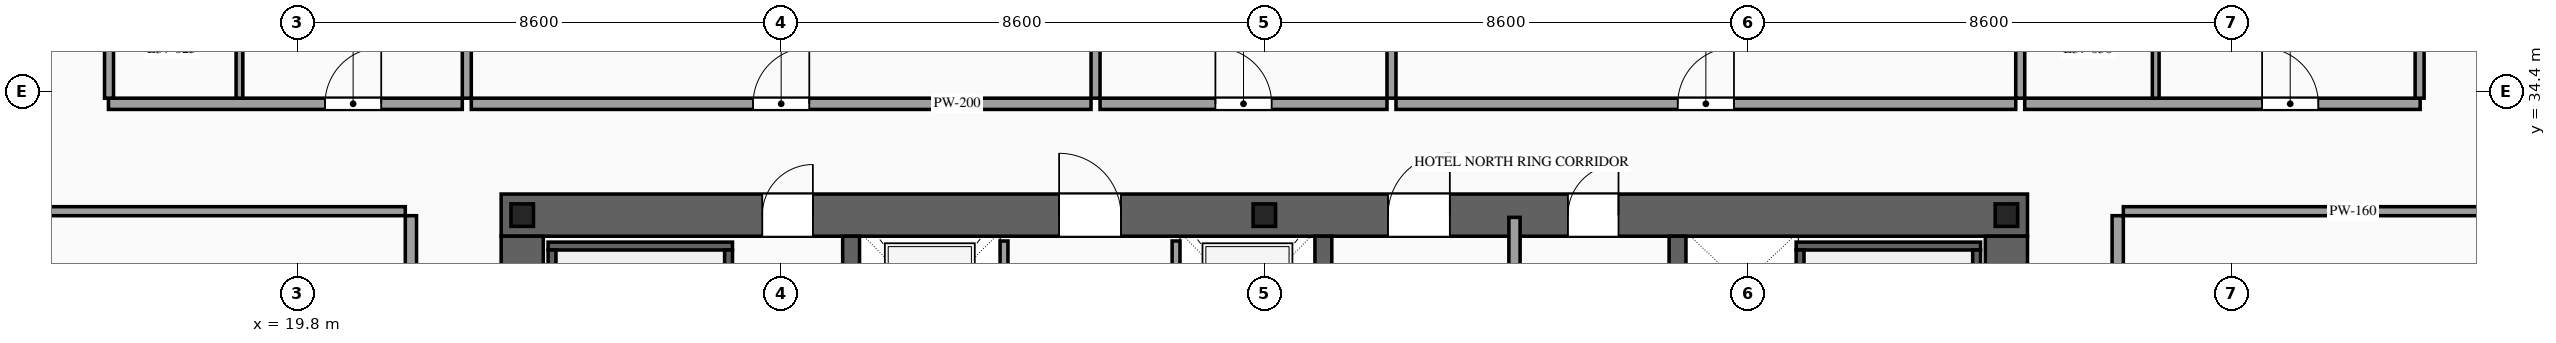
"""IFC4 building model, lengths in metres.
Left out: names, types, materials, properties, quantities, classifications, styles, units other than length and angle.
Written with IfcOpenShell. Run it as: python <this file> out.ifc"""

import sys

from ifc_helpers import new_model, si_unit, direction, frame, frame_2d, origin, origin_2d, place, context, subcontext, project, spatial, rectangle, i_section, extrude, source, transform, mapped, element, fill, save


model = new_model("IFC4")
c1 = context("Model", 3, precision=1e-05, world=origin(), true_north=direction((0.0, 1.0)))
c2 = subcontext(c1, "Body", "Model", "MODEL_VIEW")
j1 = project(units=[si_unit("LENGTHUNIT", "METRE"), si_unit("PLANEANGLEUNIT", "RADIAN")], contexts=[c1])
p1 = place(None, origin())
s1 = spatial("IfcSite", under=j1, at=p1, CompositionType="ELEMENT")
p2 = place(p1, origin())
s2 = spatial("IfcBuilding", under=s1, at=p2, CompositionType="ELEMENT")
p3 = place(p2, frame((0.0, 0.0, 141.6)))
s3 = spatial("IfcBuildingStorey", under=s2, at=p3, CompositionType="ELEMENT", Elevation=141.6)
p4 = place(p3, frame((23.425, 32.2, 0.0), z_axis=(0.0, 0.0, 1.0), x_axis=(1.0, 0.0, 0.0)))
e1 = element("IfcWall", 1, at=p4, inside=s3, PredefinedType="SHEAR", context=c2, shape_type="SweptSolid", body=[
    extrude(rectangle(XDim=27.15, YDim=0.75, at=frame_2d((13.575, 0.0))), origin(), (0.0, 0.0, 1.0), 3.6),
])
p5 = place(p4, frame((4.645, 0.0, 0.0)))
e2 = element("IfcOpeningElement", 2, at=p5, cuts=e1, PredefinedType="OPENING", context=c2, shape_type="SweptSolid", body=[
    extrude(rectangle(XDim=0.9, YDim=2.15, at=frame_2d((0.45, 1.075))), frame((0.0, 0.39, 0.0), z_axis=(0.0, -1.0, 0.0), x_axis=(1.0, 0.0, 0.0)), (0.0, 0.0, 1.0), 0.78),
])
p6 = place(p4, frame((9.925, 0.0, 0.0)))
e3 = element("IfcOpeningElement", 3, at=p6, cuts=e1, PredefinedType="OPENING", context=c2, shape_type="SweptSolid", body=[
    extrude(rectangle(XDim=1.1, YDim=2.2, at=frame_2d((0.55, 1.1))), frame((0.0, 0.39, 0.0), z_axis=(0.0, -1.0, 0.0), x_axis=(1.0, 0.0, 0.0)), (0.0, 0.0, 1.0), 0.78),
])
p7 = place(p4, frame((15.775, 0.0, 0.0)))
e4 = element("IfcOpeningElement", 4, at=p7, cuts=e1, PredefinedType="OPENING", context=c2, shape_type="SweptSolid", body=[
    extrude(rectangle(XDim=1.1, YDim=2.2, at=frame_2d((0.55, 1.1))), frame((0.0, 0.39, 0.0), z_axis=(0.0, -1.0, 0.0), x_axis=(1.0, 0.0, 0.0)), (0.0, 0.0, 1.0), 0.78),
])
p8 = place(p4, frame((18.975, 0.0, 0.0)))
e5 = element("IfcOpeningElement", 5, at=p8, cuts=e1, PredefinedType="OPENING", context=c2, shape_type="SweptSolid", body=[
    extrude(rectangle(XDim=0.9, YDim=2.15, at=frame_2d((0.45, 1.075))), frame((0.0, 0.39, 0.0), z_axis=(0.0, -1.0, 0.0), x_axis=(1.0, 0.0, 0.0)), (0.0, 0.0, 1.0), 0.78),
])
m1 = source(origin(), c2, "Body", "SweptSolid", [
    extrude(rectangle(XDim=12.05, YDim=0.75, at=frame_2d((6.025, 0.0))), origin(), (0.0, 0.0, 1.0), 3.6),
])
for number, where, z_axis, x_axis in (
    (6, (23.8, 19.775, 0.0), (0.0, 0.0, 1.0), (0.0, 1.0, 0.0)),
    (7, (50.2, 19.775, 0.0), (0.0, 0.0, 1.0), (0.0, 1.0, 0.0)),
):
    element("IfcWall", number, at=place(p3, frame(where, z_axis=z_axis, x_axis=x_axis)), inside=s3, PredefinedType="SHEAR", context=c2, shape_type="MappedRepresentation", body=[
        mapped(m1, transform((0.0, 0.0, 0.0), scale=1.0)),
    ])
m2 = source(origin(), c2, "Body", "SweptSolid", [
    extrude(rectangle(XDim=12.05, YDim=0.3, at=frame_2d((6.025, 0.0))), origin(), (0.0, 0.0, 1.0), 3.6),
])
for number, where, z_axis, x_axis in (
    (8, (29.65, 19.775, 0.0), (0.0, 0.0, 1.0), (0.0, 1.0, 0.0)),
    (9, (38.05, 19.775, 0.0), (0.0, 0.0, 1.0), (0.0, 1.0, 0.0)),
    (10, (44.35, 19.775, 0.0), (0.0, 0.0, 1.0), (0.0, 1.0, 0.0)),
):
    element("IfcWall", number, at=place(p3, frame(where, z_axis=z_axis, x_axis=x_axis)), inside=s3, PredefinedType="SOLIDWALL", context=c2, shape_type="MappedRepresentation", body=[
        mapped(m2, transform((0.0, 0.0, 0.0), scale=1.0)),
    ])
m3 = source(origin(), c2, "Body", "SweptSolid", [
    extrude(i_section(OverallWidth=0.4, OverallDepth=0.4, WebThickness=0.013, FlangeThickness=0.021, at=origin_2d()), origin(), (0.0, 0.0, 1.0), 3.6),
])
for number, where, z_axis, x_axis in (
    (11, (23.8, 32.2, 0.0), (0.0, 0.0, 1.0), (1.0, 0.0, 0.0)),
    (12, (37.0, 32.2, 0.0), (0.0, 0.0, 1.0), (1.0, 0.0, 0.0)),
    (13, (50.2, 32.2, 0.0), (0.0, 0.0, 1.0), (1.0, 0.0, 0.0)),
):
    element("IfcColumn", number, at=place(p3, frame(where, z_axis=z_axis, x_axis=x_axis)), inside=s3, PredefinedType="COLUMN", context=c2, shape_type="MappedRepresentation", body=[
        mapped(m3, transform((0.0, 0.0, 0.0), scale=1.0)),
    ])
p9 = place(p3, frame((32.37, 29.4, 0.0), z_axis=(0.0, 0.0, 1.0), x_axis=(0.0, 1.0, 0.0)))
e14 = element("IfcWall", 14, at=p9, inside=s3, PredefinedType="SOLIDWALL", context=c2, shape_type="SweptSolid", body=[
    extrude(rectangle(XDim=2.34, YDim=0.14, at=frame_2d((1.17, 0.0))), origin(), (0.0, 0.0, 1.0), 3.38),
])
p10 = place(p9, frame((0.62, 0.0, 0.0)))
e15 = element("IfcOpeningElement", 15, at=p10, cuts=e14, PredefinedType="OPENING", context=c2, shape_type="SweptSolid", body=[
    extrude(rectangle(XDim=1.1, YDim=2.2, at=frame_2d((0.55, 1.1))), frame((0.0, 0.085, 0.0), z_axis=(0.0, -1.0, 0.0), x_axis=(1.0, 0.0, 0.0)), (0.0, 0.0, 1.0), 0.17),
])
p11 = place(p3, frame((35.43, 29.4, 0.0), z_axis=(0.0, 0.0, 1.0), x_axis=(0.0, 1.0, 0.0)))
e16 = element("IfcWall", 16, at=p11, inside=s3, PredefinedType="SOLIDWALL", context=c2, shape_type="SweptSolid", body=[
    extrude(rectangle(XDim=2.34, YDim=0.14, at=frame_2d((1.17, 0.0))), origin(), (0.0, 0.0, 1.0), 3.38),
])
p12 = place(p11, frame((0.62, 0.0, 0.0)))
e17 = element("IfcOpeningElement", 17, at=p12, cuts=e16, PredefinedType="OPENING", context=c2, shape_type="SweptSolid", body=[
    extrude(rectangle(XDim=1.1, YDim=2.2, at=frame_2d((0.55, 1.1))), frame((0.0, 0.085, 0.0), z_axis=(0.0, -1.0, 0.0), x_axis=(1.0, 0.0, 0.0)), (0.0, 0.0, 1.0), 0.17),
])
m4 = source(origin(), c2, "Body", "SweptSolid", [
    extrude(rectangle(XDim=3.28, YDim=0.14, at=frame_2d((1.64, 0.0))), origin(), (0.0, 0.0, 1.0), 3.38),
])
p13 = place(p3, frame((24.26, 31.65, 0.0), z_axis=(0.0, 0.0, 1.0), x_axis=(1.0, 0.0, 0.0)))
e18 = element("IfcWall", 18, at=p13, inside=s3, PredefinedType="SOLIDWALL", context=c2, shape_type="MappedRepresentation", body=[
    mapped(m4, transform((0.0, 0.0, 0.0), scale=1.0)),
])
m5 = source(origin(), c2, "Body", "SweptSolid", [
    extrude(rectangle(XDim=8.94, YDim=0.14, at=frame_2d((4.47, 0.0))), origin(), (0.0, 0.0, 1.0), 3.38),
])
for number, where, z_axis, x_axis in (
    (19, (24.33, 22.64, 0.0), (0.0, 0.0, 1.0), (0.0, 1.0, 0.0)),
    (20, (27.47, 22.64, 0.0), (0.0, 0.0, 1.0), (0.0, 1.0, 0.0)),
):
    element("IfcWall", number, at=place(p3, frame(where, z_axis=z_axis, x_axis=x_axis)), inside=s3, PredefinedType="SOLIDWALL", context=c2, shape_type="MappedRepresentation", body=[
        mapped(m5, transform((0.0, 0.0, 0.0), scale=1.0)),
    ])
p14 = place(p3, frame((46.46, 31.65, 0.0), z_axis=(0.0, 0.0, 1.0), x_axis=(1.0, 0.0, 0.0)))
e21 = element("IfcWall", 21, at=p14, inside=s3, PredefinedType="SOLIDWALL", context=c2, shape_type="MappedRepresentation", body=[
    mapped(m4, transform((0.0, 0.0, 0.0), scale=1.0)),
])
for number, where, z_axis, x_axis in (
    (22, (46.53, 22.64, 0.0), (0.0, 0.0, 1.0), (0.0, 1.0, 0.0)),
    (23, (49.67, 22.64, 0.0), (0.0, 0.0, 1.0), (0.0, 1.0, 0.0)),
):
    element("IfcWall", number, at=place(p3, frame(where, z_axis=z_axis, x_axis=x_axis)), inside=s3, PredefinedType="SOLIDWALL", context=c2, shape_type="MappedRepresentation", body=[
        mapped(m5, transform((0.0, 0.0, 0.0), scale=1.0)),
    ])
m6 = source(origin(), c2, "Body", "SweptSolid", [
    extrude(rectangle(XDim=5.96, YDim=0.2, at=frame_2d((2.98, 0.0))), origin(), (0.0, 0.0, 1.0), 3.38),
])
p15 = place(p3, frame((41.45, 26.2, 0.0), z_axis=(0.0, 0.0, 1.0), x_axis=(0.0, 1.0, 0.0)))
e24 = element("IfcWall", 24, at=p15, inside=s3, PredefinedType="PARTITIONING", context=c2, shape_type="MappedRepresentation", body=[
    mapped(m6, transform((0.0, 0.0, 0.0), scale=1.0)),
])
p16 = place(p3, frame((16.44, 34.18, 0.0), z_axis=(0.0, 0.0, 1.0), x_axis=(1.0, 0.0, 0.0)))
e25 = element("IfcWall", 25, at=p16, inside=s3, PredefinedType="PARTITIONING", context=c2, shape_type="SweptSolid", body=[
    extrude(rectangle(XDim=6.294, YDim=0.2, at=frame_2d((3.147, 0.0))), origin(), (0.0, 0.0, 1.0), 3.38),
])
p17 = place(p16, frame((3.852, 0.0, 0.0)))
e26 = element("IfcOpeningElement", 26, at=p17, cuts=e25, PredefinedType="OPENING", context=c2, shape_type="SweptSolid", body=[
    extrude(rectangle(XDim=1.0, YDim=2.2, at=frame_2d((0.5, 1.1))), frame((0.0, 0.115, 0.0), z_axis=(0.0, -1.0, 0.0), x_axis=(1.0, 0.0, 0.0)), (0.0, 0.0, 1.0), 0.23),
])
m7 = source(origin(), c2, "Body", "SweptSolid", [
    extrude(rectangle(XDim=14.97, YDim=0.16, at=frame_2d((7.485, 0.0))), origin(), (0.0, 0.0, 1.0), 3.38),
])
p18 = place(p3, frame((22.814, 34.28, 0.0), z_axis=(0.0, 0.0, 1.0), x_axis=(0.0, 1.0, 0.0)))
e27 = element("IfcWall", 27, at=p18, inside=s3, PredefinedType="PARTITIONING", context=c2, shape_type="MappedRepresentation", body=[
    mapped(m7, transform((0.0, 0.0, 0.0), scale=1.0)),
])
m8 = source(origin(), c2, "Body", "SweptSolid", [
    extrude(rectangle(XDim=2.42, YDim=0.12, at=frame_2d((1.21, 0.0))), origin(), (0.0, 0.0, 1.0), 3.38),
])
p19 = place(p3, frame((18.77, 34.28, 0.0), z_axis=(0.0, 0.0, 1.0), x_axis=(0.0, 1.0, 0.0)))
e28 = element("IfcWall", 28, at=p19, inside=s3, PredefinedType="PARTITIONING", context=c2, shape_type="MappedRepresentation", body=[
    mapped(m8, transform((0.0, 0.0, 0.0), scale=1.0)),
])
p20 = place(p3, frame((22.894, 34.18, 0.0), z_axis=(0.0, 0.0, 1.0), x_axis=(1.0, 0.0, 0.0)))
e29 = element("IfcWall", 29, at=p20, inside=s3, PredefinedType="PARTITIONING", context=c2, shape_type="SweptSolid", body=[
    extrude(rectangle(XDim=11.024, YDim=0.2, at=frame_2d((5.512, 0.0))), origin(), (0.0, 0.0, 1.0), 3.38),
])
p21 = place(p20, frame((5.012, 0.0, 0.0)))
e30 = element("IfcOpeningElement", 30, at=p21, cuts=e29, PredefinedType="OPENING", context=c2, shape_type="SweptSolid", body=[
    extrude(rectangle(XDim=1.0, YDim=2.2, at=frame_2d((0.5, 1.1))), frame((0.0, 0.115, 0.0), z_axis=(0.0, -1.0, 0.0), x_axis=(1.0, 0.0, 0.0)), (0.0, 0.0, 1.0), 0.23),
])
p22 = place(p3, frame((33.998, 34.28, 0.0), z_axis=(0.0, 0.0, 1.0), x_axis=(0.0, 1.0, 0.0)))
e31 = element("IfcWall", 31, at=p22, inside=s3, PredefinedType="PARTITIONING", context=c2, shape_type="MappedRepresentation", body=[
    mapped(m7, transform((0.0, 0.0, 0.0), scale=1.0)),
])
p23 = place(p3, frame((34.078, 34.18, 0.0), z_axis=(0.0, 0.0, 1.0), x_axis=(1.0, 0.0, 0.0)))
e32 = element("IfcWall", 32, at=p23, inside=s3, PredefinedType="PARTITIONING", context=c2, shape_type="SweptSolid", body=[
    extrude(rectangle(XDim=5.104, YDim=0.2, at=frame_2d((2.552, 0.0))), origin(), (0.0, 0.0, 1.0), 3.38),
])
p24 = place(p23, frame((2.052, 0.0, 0.0)))
e33 = element("IfcOpeningElement", 33, at=p24, cuts=e32, PredefinedType="OPENING", context=c2, shape_type="SweptSolid", body=[
    extrude(rectangle(XDim=1.0, YDim=2.2, at=frame_2d((0.5, 1.1))), frame((0.0, 0.115, 0.0), z_axis=(0.0, -1.0, 0.0), x_axis=(1.0, 0.0, 0.0)), (0.0, 0.0, 1.0), 0.23),
])
p25 = place(p3, frame((39.262, 34.28, 0.0), z_axis=(0.0, 0.0, 1.0), x_axis=(0.0, 1.0, 0.0)))
e34 = element("IfcWall", 34, at=p25, inside=s3, PredefinedType="PARTITIONING", context=c2, shape_type="MappedRepresentation", body=[
    mapped(m7, transform((0.0, 0.0, 0.0), scale=1.0)),
])
p26 = place(p3, frame((39.342, 34.18, 0.0), z_axis=(0.0, 0.0, 1.0), x_axis=(1.0, 0.0, 0.0)))
e35 = element("IfcWall", 35, at=p26, inside=s3, PredefinedType="PARTITIONING", context=c2, shape_type="SweptSolid", body=[
    extrude(rectangle(XDim=11.024, YDim=0.2, at=frame_2d((5.512, 0.0))), origin(), (0.0, 0.0, 1.0), 3.38),
])
p27 = place(p26, frame((5.012, 0.0, 0.0)))
e36 = element("IfcOpeningElement", 36, at=p27, cuts=e35, PredefinedType="OPENING", context=c2, shape_type="SweptSolid", body=[
    extrude(rectangle(XDim=1.0, YDim=2.2, at=frame_2d((0.5, 1.1))), frame((0.0, 0.115, 0.0), z_axis=(0.0, -1.0, 0.0), x_axis=(1.0, 0.0, 0.0)), (0.0, 0.0, 1.0), 0.23),
])
p28 = place(p3, frame((50.446, 34.28, 0.0), z_axis=(0.0, 0.0, 1.0), x_axis=(0.0, 1.0, 0.0)))
e37 = element("IfcWall", 37, at=p28, inside=s3, PredefinedType="PARTITIONING", context=c2, shape_type="MappedRepresentation", body=[
    mapped(m7, transform((0.0, 0.0, 0.0), scale=1.0)),
])
p29 = place(p3, frame((50.526, 34.18, 0.0), z_axis=(0.0, 0.0, 1.0), x_axis=(1.0, 0.0, 0.0)))
e38 = element("IfcWall", 38, at=p29, inside=s3, PredefinedType="PARTITIONING", context=c2, shape_type="SweptSolid", body=[
    extrude(rectangle(XDim=7.034, YDim=0.2, at=frame_2d((3.517, 0.0))), origin(), (0.0, 0.0, 1.0), 3.38),
])
p30 = place(p29, frame((4.222, 0.0, 0.0)))
e39 = element("IfcOpeningElement", 39, at=p30, cuts=e38, PredefinedType="OPENING", context=c2, shape_type="SweptSolid", body=[
    extrude(rectangle(XDim=1.0, YDim=2.2, at=frame_2d((0.5, 1.1))), frame((0.0, 0.115, 0.0), z_axis=(0.0, -1.0, 0.0), x_axis=(1.0, 0.0, 0.0)), (0.0, 0.0, 1.0), 0.23),
])
m9 = source(origin(), c2, "Body", "SweptSolid", [
    extrude(rectangle(XDim=14.82, YDim=0.16, at=frame_2d((7.41, 0.0))), origin(), (0.0, 0.0, 1.0), 3.38),
])
for number, where, z_axis, x_axis in (
    (40, (16.45, 34.28, 0.0), (0.0, 0.0, 1.0), (0.0, 1.0, 0.0)),
    (41, (57.55, 34.28, 0.0), (0.0, 0.0, 1.0), (0.0, 1.0, 0.0)),
):
    element("IfcWall", number, at=place(p3, frame(where, z_axis=z_axis, x_axis=x_axis)), inside=s3, PredefinedType="PARTITIONING", context=c2, shape_type="MappedRepresentation", body=[
        mapped(m9, transform((0.0, 0.0, 0.0), scale=1.0)),
    ])
p31 = place(p3, frame((52.856, 34.28, 0.0), z_axis=(0.0, 0.0, 1.0), x_axis=(0.0, 1.0, 0.0)))
e42 = element("IfcWall", 42, at=p31, inside=s3, PredefinedType="PARTITIONING", context=c2, shape_type="MappedRepresentation", body=[
    mapped(m8, transform((0.0, 0.0, 0.0), scale=1.0)),
])
p32 = place(p3, frame((21.82, 25.88, 0.0), z_axis=(0.0, 0.0, 1.0), x_axis=(0.0, 1.0, 0.0)))
e43 = element("IfcWall", 43, at=p32, inside=s3, PredefinedType="PARTITIONING", context=c2, shape_type="SweptSolid", body=[
    extrude(rectangle(XDim=6.31, YDim=0.2, at=frame_2d((3.155, 0.0))), origin(), (0.0, 0.0, 1.0), 3.38),
])
p33 = place(p32, frame((3.835, 0.0, 0.0)))
e44 = element("IfcOpeningElement", 44, at=p33, cuts=e43, PredefinedType="OPENING", context=c2, shape_type="SweptSolid", body=[
    extrude(rectangle(XDim=1.0, YDim=2.2, at=frame_2d((0.5, 1.1))), frame((0.0, 0.115, 0.0), z_axis=(0.0, -1.0, 0.0), x_axis=(1.0, 0.0, 0.0)), (0.0, 0.0, 1.0), 0.23),
])
m10 = source(origin(), c2, "Body", "SweptSolid", [
    extrude(rectangle(XDim=8.17, YDim=0.16, at=frame_2d((4.085, 0.0))), origin(), (0.0, 0.0, 1.0), 2.875),
])
p34 = place(p3, frame((13.55, 32.27, 0.0), z_axis=(0.0, 0.0, 1.0), x_axis=(1.0, 0.0, 0.0)))
e45 = element("IfcWall", 45, at=p34, inside=s3, PredefinedType="PARTITIONING", context=c2, shape_type="MappedRepresentation", body=[
    mapped(m10, transform((0.0, 0.0, 0.0), scale=1.0)),
])
p35 = place(p3, frame((52.18, 25.88, 0.0), z_axis=(0.0, 0.0, 1.0), x_axis=(0.0, 1.0, 0.0)))
e46 = element("IfcWall", 46, at=p35, inside=s3, PredefinedType="PARTITIONING", context=c2, shape_type="SweptSolid", body=[
    extrude(rectangle(XDim=6.31, YDim=0.2, at=frame_2d((3.155, 0.0))), origin(), (0.0, 0.0, 1.0), 3.38),
])
p36 = place(p35, frame((3.835, 0.0, 0.0)))
e47 = element("IfcOpeningElement", 47, at=p36, cuts=e46, PredefinedType="OPENING", context=c2, shape_type="SweptSolid", body=[
    extrude(rectangle(XDim=1.0, YDim=2.2, at=frame_2d((0.5, 1.1))), frame((0.0, 0.115, 0.0), z_axis=(0.0, -1.0, 0.0), x_axis=(1.0, 0.0, 0.0)), (0.0, 0.0, 1.0), 0.23),
])
p37 = place(p3, frame((52.28, 32.27, 0.0), z_axis=(0.0, 0.0, 1.0), x_axis=(1.0, 0.0, 0.0)))
e48 = element("IfcWall", 48, at=p37, inside=s3, PredefinedType="PARTITIONING", context=c2, shape_type="MappedRepresentation", body=[
    mapped(m10, transform((0.0, 0.0, 0.0), scale=1.0)),
])
m11 = source(origin(), c2, "Body", "SweptSolid", [
    extrude(rectangle(XDim=0.9, YDim=2.15, at=frame_2d((0.45, 1.075))), frame((0.0, 0.025, 0.0), z_axis=(0.0, -1.0, 0.0), x_axis=(1.0, 0.0, 0.0)), (0.0, 0.0, 1.0), 0.05),
])
p38 = place(p5, origin())
e49 = element("IfcDoor", 49, at=p38, inside=s3, OperationType="SINGLE_SWING_RIGHT", PredefinedType="DOOR", context=c2, shape_type="MappedRepresentation", body=[
    mapped(m11, transform((0.0, 0.0, 0.0), scale=1.0)),
])
fill(e2, e49)
m12 = source(origin(), c2, "Body", "SweptSolid", [
    extrude(rectangle(XDim=1.1, YDim=2.2, at=frame_2d((0.55, 1.1))), frame((0.0, 0.025, 0.0), z_axis=(0.0, -1.0, 0.0), x_axis=(1.0, 0.0, 0.0)), (0.0, 0.0, 1.0), 0.05),
])
p39 = place(p6, origin())
e50 = element("IfcDoor", 50, at=p39, inside=s3, OperationType="SINGLE_SWING_LEFT", PredefinedType="DOOR", context=c2, shape_type="MappedRepresentation", body=[
    mapped(m12, transform((0.0, 0.0, 0.0), scale=1.0)),
])
fill(e3, e50)
p40 = place(p7, origin())
e51 = element("IfcDoor", 51, at=p40, inside=s3, OperationType="SINGLE_SWING_RIGHT", PredefinedType="DOOR", context=c2, shape_type="MappedRepresentation", body=[
    mapped(m12, transform((0.0, 0.0, 0.0), scale=1.0)),
])
fill(e4, e51)
p41 = place(p8, origin())
e52 = element("IfcDoor", 52, at=p41, inside=s3, OperationType="SINGLE_SWING_RIGHT", PredefinedType="DOOR", context=c2, shape_type="MappedRepresentation", body=[
    mapped(m11, transform((0.0, 0.0, 0.0), scale=1.0)),
])
fill(e5, e52)
m13 = source(origin(), c2, "Body", "SweptSolid", [
    extrude(rectangle(XDim=1.0, YDim=2.2, at=frame_2d((0.5, 1.1))), frame((0.0, 0.025, 0.0), z_axis=(0.0, -1.0, 0.0), x_axis=(1.0, 0.0, 0.0)), (0.0, 0.0, 1.0), 0.05),
])
p42 = place(p17, origin())
e53 = element("IfcDoor", 53, at=p42, inside=s3, OperationType="SINGLE_SWING_RIGHT", PredefinedType="DOOR", context=c2, shape_type="MappedRepresentation", body=[
    mapped(m13, transform((0.0, 0.0, 0.0), scale=1.0)),
])
fill(e26, e53)
p43 = place(p21, origin())
e54 = element("IfcDoor", 54, at=p43, inside=s3, OperationType="SINGLE_SWING_RIGHT", PredefinedType="DOOR", context=c2, shape_type="MappedRepresentation", body=[
    mapped(m13, transform((0.0, 0.0, 0.0), scale=1.0)),
])
fill(e30, e54)
p44 = place(p24, origin())
e55 = element("IfcDoor", 55, at=p44, inside=s3, OperationType="SINGLE_SWING_LEFT", PredefinedType="DOOR", context=c2, shape_type="MappedRepresentation", body=[
    mapped(m13, transform((0.0, 0.0, 0.0), scale=1.0)),
])
fill(e33, e55)
p45 = place(p27, origin())
e56 = element("IfcDoor", 56, at=p45, inside=s3, OperationType="SINGLE_SWING_RIGHT", PredefinedType="DOOR", context=c2, shape_type="MappedRepresentation", body=[
    mapped(m13, transform((0.0, 0.0, 0.0), scale=1.0)),
])
fill(e36, e56)
p46 = place(p30, origin())
e57 = element("IfcDoor", 57, at=p46, inside=s3, OperationType="SINGLE_SWING_LEFT", PredefinedType="DOOR", context=c2, shape_type="MappedRepresentation", body=[
    mapped(m13, transform((0.0, 0.0, 0.0), scale=1.0)),
])
fill(e39, e57)
save(model, sys.argv[1])
